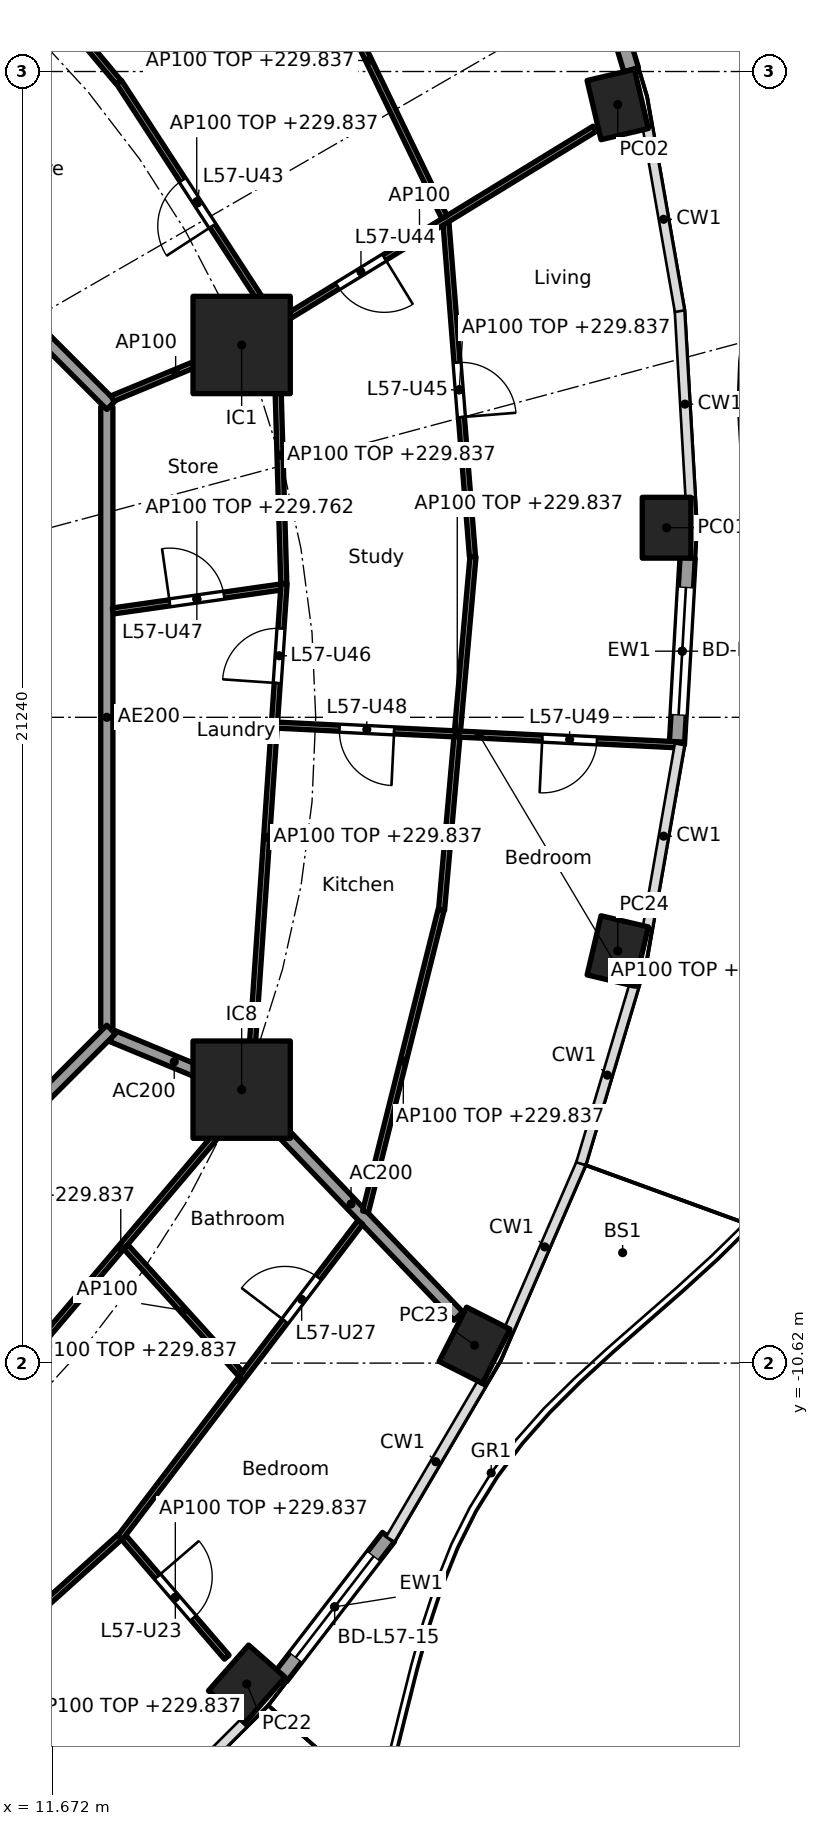
"""IFC4 building model, lengths in metres.
Left out: names, types, materials, properties, quantities, classifications, styles, units other than length and angle.
Written with IfcOpenShell. Run it as: python <this file> out.ifc"""

import sys

from ifc_helpers import new_model, si_unit, direction, frame, frame_2d, origin, origin_2d, place, context, subcontext, project, spatial, rectangle, hollow_rectangle, extrude, element, fill, save


model = new_model("IFC4")
c1 = context("Model", 3, precision=1e-05, world=origin(), true_north=direction((0.0, 1.0)))
c2 = subcontext(c1, "Body", "Model", "MODEL_VIEW")
j1 = project(units=[si_unit("LENGTHUNIT", "METRE"), si_unit("PLANEANGLEUNIT", "RADIAN")], contexts=[c1])
p1 = place(None, origin())
s1 = spatial("IfcSite", under=j1, at=p1, CompositionType="ELEMENT")
p2 = place(p1, origin())
s2 = spatial("IfcBuilding", under=s1, at=p2, CompositionType="ELEMENT")
p3 = place(p2, frame((0.0, 0.0, 227.0)))
s3 = spatial("IfcBuildingStorey", under=s2, at=p3, CompositionType="ELEMENT", Elevation=227.0)
for number, where, z_axis, x_axis in (
    (1, (21.77, 3.118, 0.0), (0.0, 0.0, 1.0), (0.0, 1.0, 0.0)),
    (2, (20.967, 10.077, 0.0), (0.0, 0.0, 1.0), (-0.229, 0.973, 0.0)),
    (3, (14.866, -15.896, 0.0), (0.0, 0.0, 1.0), (0.66, 0.751, 0.0)),
    (4, (18.612, -10.327, 0.0), (0.0, 0.0, 1.0), (0.452, 0.892, 0.0)),
    (5, (20.967, -3.842, 0.0), (0.0, 0.0, 1.0), (0.229, 0.973, 0.0)),
):
    element("IfcColumn", number, at=place(p3, frame(where, z_axis=z_axis, x_axis=x_axis)), inside=s3, PredefinedType="COLUMN", context=c2, shape_type="SweptSolid", body=[
        extrude(hollow_rectangle(XDim=1.0, YDim=0.8, WallThickness=0.032, at=origin_2d()), origin(), (0.0, 0.0, 1.0), 3.7),
    ])
for number, where, z_axis, x_axis in (
    (6, (14.782, 6.123, 0.0), (0.0, 0.0, 1.0), (1.0, 0.0, 0.0)),
    (7, (14.782, -6.123, 0.0), (0.0, 0.0, 1.0), (1.0, 0.0, 0.0)),
):
    element("IfcColumn", number, at=place(p3, frame(where, z_axis=z_axis, x_axis=x_axis)), inside=s3, PredefinedType="COLUMN", context=c2, shape_type="SweptSolid", body=[
        extrude(rectangle(XDim=1.6, YDim=1.6, at=origin_2d()), origin(), (0.0, 0.0, 1.0), 3.7),
    ])
p4 = place(p3, frame((20.318, 13.564, 0.0), z_axis=(0.0, 0.0, 1.0), x_axis=(0.285785716255, -0.958293548128, 0.0)))
e8 = element("IfcWall", 8, at=p4, inside=s3, PredefinedType="SOLIDWALL", context=c2, shape_type="SweptSolid", body=[
    extrude(rectangle(XDim=3.04, YDim=0.25, at=frame_2d((1.52, 0.0))), origin(), (0.0, 0.0, 1.0), 3.44),
])
p5 = place(p4, frame((0.47, 0.0, 0.0)))
e9 = element("IfcOpeningElement", 9, at=p5, cuts=e8, PredefinedType="OPENING", context=c2, shape_type="SweptSolid", body=[
    extrude(rectangle(XDim=2.1, YDim=2.4, at=frame_2d((1.05, 1.2))), frame((0.0, 0.135, 0.0), z_axis=(0.0, -1.0, 0.0), x_axis=(1.0, 0.0, 0.0)), (0.0, 0.0, 1.0), 0.27),
])
p6 = place(p3, frame((17.197, -13.48, 0.0), z_axis=(0.0, 0.0, 1.0), x_axis=(-0.610438565676, -0.792063607001, 0.0)))
e10 = element("IfcWall", 10, at=p6, inside=s3, PredefinedType="SOLIDWALL", context=c2, shape_type="SweptSolid", body=[
    extrude(rectangle(XDim=2.901, YDim=0.25, at=frame_2d((1.45, 0.0))), origin(), (0.0, 0.0, 1.0), 3.44),
])
p7 = place(p6, frame((0.4, 0.0, 0.0)))
e11 = element("IfcOpeningElement", 11, at=p7, cuts=e10, PredefinedType="OPENING", context=c2, shape_type="SweptSolid", body=[
    extrude(rectangle(XDim=2.1, YDim=2.4, at=frame_2d((1.05, 1.2))), frame((0.0, 0.135, 0.0), z_axis=(0.0, -1.0, 0.0), x_axis=(1.0, 0.0, 0.0)), (0.0, 0.0, 1.0), 0.27),
])
p8 = place(p3, frame((22.116, 2.626, 0.0), z_axis=(0.0, 0.0, 1.0), x_axis=(-0.057528189427, -0.998343882348, 0.0)))
e12 = element("IfcWall", 12, at=p8, inside=s3, PredefinedType="SOLIDWALL", context=c2, shape_type="SweptSolid", body=[
    extrude(rectangle(XDim=3.081, YDim=0.25, at=frame_2d((1.541, 0.0))), origin(), (0.0, 0.0, 1.0), 3.44),
])
p9 = place(p8, frame((0.49, 0.0, 0.0)))
e13 = element("IfcOpeningElement", 13, at=p9, cuts=e12, PredefinedType="OPENING", context=c2, shape_type="SweptSolid", body=[
    extrude(rectangle(XDim=2.1, YDim=2.4, at=frame_2d((1.05, 1.2))), frame((0.0, 0.135, 0.0), z_axis=(0.0, -1.0, 0.0), x_axis=(1.0, 0.0, 0.0)), (0.0, 0.0, 1.0), 0.27),
])
p10 = place(p3, frame((12.657, -5.243, 0.0), z_axis=(0.0, 0.0, 1.0), x_axis=(0.923853160736, -0.382747093259, 0.0)))
e14 = element("IfcWall", 14, at=p10, inside=s3, PredefinedType="PARTITIONING", context=c2, shape_type="SweptSolid", body=[
    extrude(rectangle(XDim=2.2, YDim=0.2, at=frame_2d((1.1, 0.0))), origin(), (0.0, 0.0, 1.0), 3.44),
])
p11 = place(p3, frame((14.817, -6.159, 0.0), z_axis=(0.0, 0.0, 1.0), x_axis=(0.691437669875, -0.722436120828, 0.0)))
e15 = element("IfcWall", 15, at=p11, inside=s3, PredefinedType="PARTITIONING", context=c2, shape_type="SweptSolid", body=[
    extrude(rectangle(XDim=5.104, YDim=0.2, at=frame_2d((2.552, 0.0))), origin(), (0.0, 0.0, 1.0), 3.44),
])
p12 = place(p3, frame((12.565, -5.104, 0.0), z_axis=(0.0, 0.0, 1.0), x_axis=(0.0, 1.0, 0.0)))
e16 = element("IfcWall", 16, at=p12, inside=s3, PredefinedType="PARTITIONING", context=c2, shape_type="SweptSolid", body=[
    extrude(rectangle(XDim=10.209, YDim=0.2, at=frame_2d((5.104, 0.0))), origin(), (0.0, 0.0, 1.0), 3.44),
])
p13 = place(p3, frame((12.635, 5.134, 0.0), z_axis=(0.0, 0.0, 1.0), x_axis=(-0.707106781187, 0.707106781187, 0.0)))
e17 = element("IfcWall", 17, at=p13, inside=s3, PredefinedType="PARTITIONING", context=c2, shape_type="SweptSolid", body=[
    extrude(rectangle(XDim=10.609, YDim=0.2, at=frame_2d((5.305, 0.0))), origin(), (0.0, 0.0, 1.0), 3.44),
])
p14 = place(p3, frame((5.275, -12.494, 0.0), z_axis=(0.0, 0.0, 1.0), x_axis=(0.707106781187, 0.707106781187, 0.0)))
e18 = element("IfcWall", 18, at=p14, inside=s3, PredefinedType="PARTITIONING", context=c2, shape_type="SweptSolid", body=[
    extrude(rectangle(XDim=10.409, YDim=0.2, at=frame_2d((5.205, 0.0))), origin(), (0.0, 0.0, 1.0), 3.44),
])
p15 = place(p3, frame((12.664, 1.749, 0.0), z_axis=(0.0, 0.0, 1.0), x_axis=(0.990007147727, 0.14101718849, 0.0)))
e19 = element("IfcWall", 19, at=p15, inside=s3, PredefinedType="PARTITIONING", context=c2, shape_type="SweptSolid", body=[
    extrude(rectangle(XDim=2.791, YDim=0.1, at=frame_2d((1.396, 0.0))), origin(), (0.0, 0.0, 1.0), 2.762),
])
p16 = place(p15, frame((0.946, 0.0, 0.0)))
e20 = element("IfcOpeningElement", 20, at=p16, cuts=e19, PredefinedType="OPENING", context=c2, shape_type="SweptSolid", body=[
    extrude(rectangle(XDim=0.9, YDim=2.1, at=frame_2d((0.45, 1.05))), frame((0.0, 0.06, 0.0), z_axis=(0.0, -1.0, 0.0), x_axis=(1.0, 0.0, 0.0)), (0.0, 0.0, 1.0), 0.12),
])
p17 = place(p3, frame((15.475, 2.2, 0.0), z_axis=(0.0, 0.0, 1.0), x_axis=(-0.029254637498, 0.999571991497, 0.0)))
e21 = element("IfcWall", 21, at=p17, inside=s3, PredefinedType="PARTITIONING", context=c2, shape_type="SweptSolid", body=[
    extrude(rectangle(XDim=4.223, YDim=0.1, at=frame_2d((2.111, 0.0))), origin(), (0.0, 0.0, 1.0), 2.837),
])
p18 = place(p3, frame((15.48, 2.199, 0.0), z_axis=(0.0, 0.0, 1.0), x_axis=(-0.068558685949, -0.997647085186, 0.0)))
e22 = element("IfcWall", 22, at=p18, inside=s3, PredefinedType="PARTITIONING", context=c2, shape_type="SweptSolid", body=[
    extrude(rectangle(XDim=8.365, YDim=0.1, at=frame_2d((4.183, 0.0))), origin(), (0.0, 0.0, 1.0), 2.837),
])
p19 = place(p18, frame((0.74, 0.0, 0.0)))
e23 = element("IfcOpeningElement", 23, at=p19, cuts=e22, PredefinedType="OPENING", context=c2, shape_type="SweptSolid", body=[
    extrude(rectangle(XDim=0.9, YDim=2.1, at=frame_2d((0.45, 1.05))), frame((0.0, 0.06, 0.0), z_axis=(0.0, -1.0, 0.0), x_axis=(1.0, 0.0, 0.0)), (0.0, 0.0, 1.0), 0.12),
])
p20 = place(p3, frame((18.578, 2.642, 0.0), z_axis=(0.0, 0.0, 1.0), x_axis=(-0.079179272956, 0.9968603928, 0.0)))
e24 = element("IfcWall", 24, at=p20, inside=s3, PredefinedType="PARTITIONING", context=c2, shape_type="SweptSolid", body=[
    extrude(rectangle(XDim=5.504, YDim=0.1, at=frame_2d((2.752, 0.0))), origin(), (0.0, 0.0, 1.0), 2.837),
])
p21 = place(p20, frame((2.302, 0.0, 0.0)))
e25 = element("IfcOpeningElement", 25, at=p21, cuts=e24, PredefinedType="OPENING", context=c2, shape_type="SweptSolid", body=[
    extrude(rectangle(XDim=0.9, YDim=2.1, at=frame_2d((0.45, 1.05))), frame((0.0, 0.06, 0.0), z_axis=(0.0, -1.0, 0.0), x_axis=(1.0, 0.0, 0.0)), (0.0, 0.0, 1.0), 0.12),
])
p22 = place(p3, frame((18.586, 2.642, 0.0), z_axis=(0.0, 0.0, 1.0), x_axis=(-0.088638473361, -0.996063863937, 0.0)))
e26 = element("IfcWall", 26, at=p22, inside=s3, PredefinedType="PARTITIONING", context=c2, shape_type="SweptSolid", body=[
    extrude(rectangle(XDim=5.836, YDim=0.1, at=frame_2d((2.918, 0.0))), origin(), (0.0, 0.0, 1.0), 2.837),
])
p23 = place(p3, frame((12.657, 5.243, 0.0), z_axis=(0.0, 0.0, 1.0), x_axis=(0.923864733477, 0.382719158442, 0.0)))
e27 = element("IfcWall", 27, at=p23, inside=s3, PredefinedType="PARTITIONING", context=c2, shape_type="SweptSolid", body=[
    extrude(rectangle(XDim=2.25, YDim=0.1, at=frame_2d((1.125, 0.0))), origin(), (0.0, 0.0, 1.0), 3.44),
])
p24 = place(p3, frame((14.825, 6.149, 0.0), z_axis=(0.0, 0.0, 1.0), x_axis=(0.852781365284, 0.522268075824, 0.0)))
e28 = element("IfcWall", 28, at=p24, inside=s3, PredefinedType="PARTITIONING", context=c2, shape_type="SweptSolid", body=[
    extrude(rectangle(XDim=6.758, YDim=0.1, at=frame_2d((3.379, 0.0))), origin(), (0.0, 0.0, 1.0), 3.44),
])
p25 = place(p24, frame((1.801, 0.0, 0.0)))
e29 = element("IfcOpeningElement", 29, at=p25, cuts=e28, PredefinedType="OPENING", context=c2, shape_type="SweptSolid", body=[
    extrude(rectangle(XDim=0.9, YDim=2.1, at=frame_2d((0.45, 1.05))), frame((0.0, 0.06, 0.0), z_axis=(0.0, -1.0, 0.0), x_axis=(1.0, 0.0, 0.0)), (0.0, 0.0, 1.0), 0.12),
])
p26 = place(p3, frame((15.323, 6.512, 0.0), z_axis=(0.0, 0.0, 1.0), x_axis=(-0.545191322361, 0.8383116497, 0.0)))
e30 = element("IfcWall", 30, at=p26, inside=s3, PredefinedType="PARTITIONING", context=c2, shape_type="SweptSolid", body=[
    extrude(rectangle(XDim=4.693, YDim=0.1, at=frame_2d((2.346, 0.0))), origin(), (0.0, 0.0, 1.0), 2.837),
])
p27 = place(p26, frame((1.871, 0.0, 0.0)))
e31 = element("IfcOpeningElement", 31, at=p27, cuts=e30, PredefinedType="OPENING", context=c2, shape_type="SweptSolid", body=[
    extrude(rectangle(XDim=0.9, YDim=2.1, at=frame_2d((0.45, 1.05))), frame((0.0, 0.06, 0.0), z_axis=(0.0, -1.0, 0.0), x_axis=(1.0, 0.0, 0.0)), (0.0, 0.0, 1.0), 0.12),
])
p28 = place(p3, frame((18.117, 8.224, 0.0), z_axis=(0.0, 0.0, 1.0), x_axis=(-0.434647681571, 0.900600573453, 0.0)))
e32 = element("IfcWall", 32, at=p28, inside=s3, PredefinedType="PARTITIONING", context=c2, shape_type="SweptSolid", body=[
    extrude(rectangle(XDim=5.724, YDim=0.1, at=frame_2d((2.862, 0.0))), origin(), (0.0, 0.0, 1.0), 2.837),
])
p29 = place(p3, frame((12.759, 10.443, 0.0), z_axis=(0.0, 0.0, 1.0), x_axis=(-0.642225196965, 0.766516011825, 0.0)))
e33 = element("IfcWall", 33, at=p29, inside=s3, PredefinedType="PARTITIONING", context=c2, shape_type="SweptSolid", body=[
    extrude(rectangle(XDim=4.361, YDim=0.1, at=frame_2d((2.18, 0.0))), origin(), (0.0, 0.0, 1.0), 2.837),
])
p30 = place(p3, frame((8.109, -17.679, 0.0), z_axis=(0.0, 0.0, 1.0), x_axis=(0.743675165651, 0.668541134108, 0.0)))
e34 = element("IfcWall", 34, at=p30, inside=s3, PredefinedType="PARTITIONING", context=c2, shape_type="SweptSolid", body=[
    extrude(rectangle(XDim=6.275, YDim=0.1, at=frame_2d((3.137, 0.0))), origin(), (0.0, 0.0, 1.0), 2.837),
])
p31 = place(p30, frame((2.712, 0.0, 0.0)))
e35 = element("IfcOpeningElement", 35, at=p31, cuts=e34, PredefinedType="OPENING", context=c2, shape_type="SweptSolid", body=[
    extrude(rectangle(XDim=0.9, YDim=2.1, at=frame_2d((0.45, 1.05))), frame((0.0, 0.06, 0.0), z_axis=(0.0, -1.0, 0.0), x_axis=(1.0, 0.0, 0.0)), (0.0, 0.0, 1.0), 0.12),
])
p32 = place(p3, frame((10.753, -11.132, 0.0), z_axis=(0.0, 0.0, 1.0), x_axis=(0.646987675252, 0.762500457752, 0.0)))
e36 = element("IfcWall", 36, at=p32, inside=s3, PredefinedType="PARTITIONING", context=c2, shape_type="SweptSolid", body=[
    extrude(rectangle(XDim=6.309, YDim=0.1, at=frame_2d((3.154, 0.0))), origin(), (0.0, 0.0, 1.0), 2.837),
])
p33 = place(p3, frame((12.845, -13.489, 0.0), z_axis=(0.0, 0.0, 1.0), x_axis=(0.652092276587, -0.758139606416, 0.0)))
e37 = element("IfcWall", 37, at=p33, inside=s3, PredefinedType="PARTITIONING", context=c2, shape_type="SweptSolid", body=[
    extrude(rectangle(XDim=2.594, YDim=0.1, at=frame_2d((1.297, 0.0))), origin(), (0.0, 0.0, 1.0), 2.837),
])
p34 = place(p33, frame((0.847, 0.0, 0.0)))
e38 = element("IfcOpeningElement", 38, at=p34, cuts=e37, PredefinedType="OPENING", context=c2, shape_type="SweptSolid", body=[
    extrude(rectangle(XDim=0.9, YDim=2.1, at=frame_2d((0.45, 1.05))), frame((0.0, 0.06, 0.0), z_axis=(0.0, -1.0, 0.0), x_axis=(1.0, 0.0, 0.0)), (0.0, 0.0, 1.0), 0.12),
])
p35 = place(p3, frame((12.782, -13.491, 0.0), z_axis=(0.0, 0.0, 1.0), x_axis=(0.606141365852, 0.79535692906, 0.0)))
e39 = element("IfcWall", 39, at=p35, inside=s3, PredefinedType="PARTITIONING", context=c2, shape_type="SweptSolid", body=[
    extrude(rectangle(XDim=6.52, YDim=0.1, at=frame_2d((3.26, 0.0))), origin(), (0.0, 0.0, 1.0), 2.837),
])
p36 = place(p35, frame((4.477, 0.0, 0.0)))
e40 = element("IfcOpeningElement", 40, at=p36, cuts=e39, PredefinedType="OPENING", context=c2, shape_type="SweptSolid", body=[
    extrude(rectangle(XDim=0.9, YDim=2.1, at=frame_2d((0.45, 1.05))), frame((0.0, 0.06, 0.0), z_axis=(0.0, -1.0, 0.0), x_axis=(1.0, 0.0, 0.0)), (0.0, 0.0, 1.0), 0.12),
])
p37 = place(p3, frame((12.876, -8.707, 0.0), z_axis=(0.0, 0.0, 1.0), x_axis=(0.670768418052, -0.741666858733, 0.0)))
e41 = element("IfcWall", 41, at=p37, inside=s3, PredefinedType="PARTITIONING", context=c2, shape_type="SweptSolid", body=[
    extrude(rectangle(XDim=2.824, YDim=0.1, at=frame_2d((1.412, 0.0))), origin(), (0.0, 0.0, 1.0), 3.44),
])
p38 = place(p3, frame((16.819, -8.129, 0.0), z_axis=(0.0, 0.0, 1.0), x_axis=(0.243041266705, 0.970015949703, 0.0)))
e42 = element("IfcWall", 42, at=p38, inside=s3, PredefinedType="PARTITIONING", context=c2, shape_type="SweptSolid", body=[
    extrude(rectangle(XDim=5.112, YDim=0.1, at=frame_2d((2.556, 0.0))), origin(), (0.0, 0.0, 1.0), 2.837),
])
p39 = place(p3, frame((15.353, -0.128, 0.0), z_axis=(0.0, 0.0, 1.0), x_axis=(0.99879606888, -0.049055201451, 0.0)))
e43 = element("IfcWall", 43, at=p39, inside=s3, PredefinedType="PARTITIONING", context=c2, shape_type="SweptSolid", body=[
    extrude(rectangle(XDim=6.679, YDim=0.1, at=frame_2d((3.339, 0.0))), origin(), (0.0, 0.0, 1.0), 2.983),
])
p40 = place(p39, frame((1.039, 0.0, 0.0)))
e44 = element("IfcOpeningElement", 44, at=p40, cuts=e43, PredefinedType="OPENING", context=c2, shape_type="SweptSolid", body=[
    extrude(rectangle(XDim=0.9, YDim=2.1, at=frame_2d((0.45, 1.05))), frame((0.0, 0.06, 0.0), z_axis=(0.0, -1.0, 0.0), x_axis=(1.0, 0.0, 0.0)), (0.0, 0.0, 1.0), 0.12),
])
p41 = place(p39, frame((4.378, 0.0, 0.0)))
e45 = element("IfcOpeningElement", 45, at=p41, cuts=e43, PredefinedType="OPENING", context=c2, shape_type="SweptSolid", body=[
    extrude(rectangle(XDim=0.9, YDim=2.1, at=frame_2d((0.45, 1.05))), frame((0.0, 0.06, 0.0), z_axis=(0.0, -1.0, 0.0), x_axis=(1.0, 0.0, 0.0)), (0.0, 0.0, 1.0), 0.12),
])
p42 = place(p7, origin())
e46 = element("IfcDoor", 46, at=p42, inside=s3, OperationType="SLIDING_TO_LEFT", PredefinedType="DOOR", context=c2, shape_type="SweptSolid", body=[
    extrude(rectangle(XDim=2.1, YDim=2.4, at=frame_2d((1.05, 1.2))), frame((0.0, 0.025, 0.0), z_axis=(0.0, -1.0, 0.0), x_axis=(1.0, 0.0, 0.0)), (0.0, 0.0, 1.0), 0.05),
])
fill(e11, e46)
p43 = place(p9, origin())
e47 = element("IfcDoor", 47, at=p43, inside=s3, OperationType="SLIDING_TO_LEFT", PredefinedType="DOOR", context=c2, shape_type="SweptSolid", body=[
    extrude(rectangle(XDim=2.1, YDim=2.4, at=frame_2d((1.05, 1.2))), frame((0.0, 0.025, 0.0), z_axis=(0.0, -1.0, 0.0), x_axis=(1.0, 0.0, 0.0)), (0.0, 0.0, 1.0), 0.05),
])
fill(e13, e47)
p44 = place(p34, origin())
e48 = element("IfcDoor", 48, at=p44, inside=s3, OperationType="SINGLE_SWING_LEFT", PredefinedType="DOOR", context=c2, shape_type="SweptSolid", body=[
    extrude(rectangle(XDim=0.9, YDim=2.1, at=frame_2d((0.45, 1.05))), frame((0.0, 0.025, 0.0), z_axis=(0.0, -1.0, 0.0), x_axis=(1.0, 0.0, 0.0)), (0.0, 0.0, 1.0), 0.05),
])
fill(e38, e48)
p45 = place(p36, origin())
e49 = element("IfcDoor", 49, at=p45, inside=s3, OperationType="SINGLE_SWING_LEFT", PredefinedType="DOOR", context=c2, shape_type="SweptSolid", body=[
    extrude(rectangle(XDim=0.9, YDim=2.1, at=frame_2d((0.45, 1.05))), frame((0.0, 0.025, 0.0), z_axis=(0.0, -1.0, 0.0), x_axis=(1.0, 0.0, 0.0)), (0.0, 0.0, 1.0), 0.05),
])
fill(e40, e49)
p46 = place(p27, origin())
e50 = element("IfcDoor", 50, at=p46, inside=s3, OperationType="SINGLE_SWING_LEFT", PredefinedType="DOOR", context=c2, shape_type="SweptSolid", body=[
    extrude(rectangle(XDim=0.9, YDim=2.1, at=frame_2d((0.45, 1.05))), frame((0.0, 0.025, 0.0), z_axis=(0.0, -1.0, 0.0), x_axis=(1.0, 0.0, 0.0)), (0.0, 0.0, 1.0), 0.05),
])
fill(e31, e50)
p47 = place(p25, frame((0.9, 0.0, 0.0), x_axis=(-1.0, 0.0, 0.0)))
e51 = element("IfcDoor", 51, at=p47, inside=s3, OperationType="SINGLE_SWING_LEFT", PredefinedType="DOOR", context=c2, shape_type="SweptSolid", body=[
    extrude(rectangle(XDim=0.9, YDim=2.1, at=frame_2d((0.45, 1.05))), frame((0.0, 0.025, 0.0), z_axis=(0.0, -1.0, 0.0), x_axis=(1.0, 0.0, 0.0)), (0.0, 0.0, 1.0), 0.05),
])
fill(e29, e51)
p48 = place(p21, frame((0.9, 0.0, 0.0), x_axis=(-1.0, 0.0, 0.0)))
e52 = element("IfcDoor", 52, at=p48, inside=s3, OperationType="SINGLE_SWING_RIGHT", PredefinedType="DOOR", context=c2, shape_type="SweptSolid", body=[
    extrude(rectangle(XDim=0.9, YDim=2.1, at=frame_2d((0.45, 1.05))), frame((0.0, 0.025, 0.0), z_axis=(0.0, -1.0, 0.0), x_axis=(1.0, 0.0, 0.0)), (0.0, 0.0, 1.0), 0.05),
])
fill(e25, e52)
p49 = place(p19, frame((0.9, 0.0, 0.0), x_axis=(-1.0, 0.0, 0.0)))
e53 = element("IfcDoor", 53, at=p49, inside=s3, OperationType="SINGLE_SWING_LEFT", PredefinedType="DOOR", context=c2, shape_type="SweptSolid", body=[
    extrude(rectangle(XDim=0.9, YDim=2.1, at=frame_2d((0.45, 1.05))), frame((0.0, 0.025, 0.0), z_axis=(0.0, -1.0, 0.0), x_axis=(1.0, 0.0, 0.0)), (0.0, 0.0, 1.0), 0.05),
])
fill(e23, e53)
p50 = place(p16, origin())
e54 = element("IfcDoor", 54, at=p50, inside=s3, OperationType="SINGLE_SWING_LEFT", PredefinedType="DOOR", context=c2, shape_type="SweptSolid", body=[
    extrude(rectangle(XDim=0.9, YDim=2.1, at=frame_2d((0.45, 1.05))), frame((0.0, 0.025, 0.0), z_axis=(0.0, -1.0, 0.0), x_axis=(1.0, 0.0, 0.0)), (0.0, 0.0, 1.0), 0.05),
])
fill(e20, e54)
p51 = place(p40, frame((0.9, 0.0, 0.0), x_axis=(-1.0, 0.0, 0.0)))
e55 = element("IfcDoor", 55, at=p51, inside=s3, OperationType="SINGLE_SWING_LEFT", PredefinedType="DOOR", context=c2, shape_type="SweptSolid", body=[
    extrude(rectangle(XDim=0.9, YDim=2.1, at=frame_2d((0.45, 1.05))), frame((0.0, 0.025, 0.0), z_axis=(0.0, -1.0, 0.0), x_axis=(1.0, 0.0, 0.0)), (0.0, 0.0, 1.0), 0.05),
])
fill(e44, e55)
p52 = place(p41, frame((0.9, 0.0, 0.0), x_axis=(-1.0, 0.0, 0.0)))
e56 = element("IfcDoor", 56, at=p52, inside=s3, OperationType="SINGLE_SWING_RIGHT", PredefinedType="DOOR", context=c2, shape_type="SweptSolid", body=[
    extrude(rectangle(XDim=0.9, YDim=2.1, at=frame_2d((0.45, 1.05))), frame((0.0, 0.025, 0.0), z_axis=(0.0, -1.0, 0.0), x_axis=(1.0, 0.0, 0.0)), (0.0, 0.0, 1.0), 0.05),
])
fill(e45, e56)
save(model, sys.argv[1])
